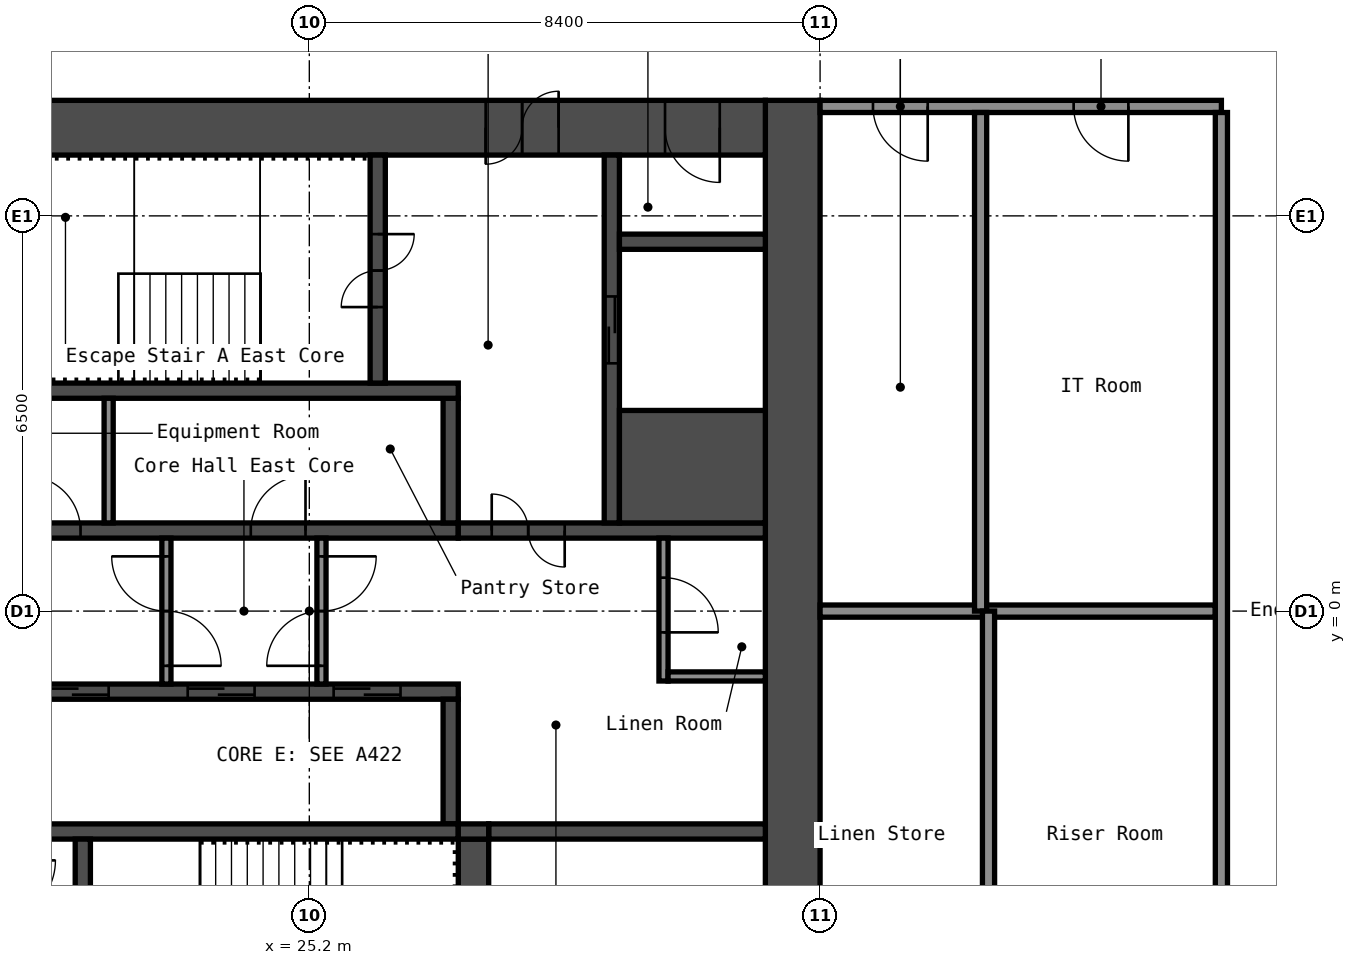
"""IFC4 building model, lengths in metres.
Left out: names, types, materials, properties, quantities, classifications, styles, units other than length and angle.
Written with IfcOpenShell. Run it as: python <this file> out.ifc"""

import sys

from ifc_helpers import new_model, si_unit, direction, frame, frame_2d, origin, place, context, subcontext, project, spatial, rectangle, extrude, element, fill, save


model = new_model("IFC4")
c1 = context("Model", 3, precision=1e-05, world=origin(), true_north=direction((0.0, 1.0)))
c2 = subcontext(c1, "Body", "Model", "MODEL_VIEW")
j1 = project(units=[si_unit("LENGTHUNIT", "METRE"), si_unit("PLANEANGLEUNIT", "RADIAN")], contexts=[c1])
p1 = place(None, origin())
s1 = spatial("IfcSite", under=j1, at=p1, CompositionType="ELEMENT")
p2 = place(p1, origin())
s2 = spatial("IfcBuilding", under=s1, at=p2, CompositionType="ELEMENT")
p3 = place(p2, frame((0.0, 0.0, 143.8)))
s3 = spatial("IfcBuildingStorey", under=s2, at=p3, CompositionType="ELEMENT", Elevation=143.8)
p4 = place(p3, frame((33.15, -8.4, 0.0), z_axis=(0.0, 0.0, 1.0), x_axis=(0.0, 1.0, 0.0)))
e1 = element("IfcWall", 1, at=p4, inside=s3, PredefinedType="SHEAR", context=c2, shape_type="SweptSolid", body=[
    extrude(rectangle(XDim=16.8, YDim=0.9, at=frame_2d((8.4, 0.0))), origin(), (0.0, 0.0, 1.0), 2.75),
])
p5 = place(p3, frame((17.7, 7.95, 0.0), z_axis=(0.0, 0.0, 1.0), x_axis=(1.0, 0.0, 0.0)))
e2 = element("IfcWall", 2, at=p5, inside=s3, PredefinedType="SHEAR", context=c2, shape_type="SweptSolid", body=[
    extrude(rectangle(XDim=15.0, YDim=0.9, at=frame_2d((7.5, 0.0))), origin(), (0.0, 0.0, 1.0), 2.75),
])
p6 = place(p5, frame((10.4, 0.0, 0.0)))
e3 = element("IfcOpeningElement", 3, at=p6, cuts=e2, PredefinedType="OPENING", context=c2, shape_type="SweptSolid", body=[
    extrude(rectangle(XDim=1.2, YDim=2.1, at=frame_2d((0.6, 1.05))), frame((0.0, 0.46, 0.0), z_axis=(0.0, -1.0, 0.0), x_axis=(1.0, 0.0, 0.0)), (0.0, 0.0, 1.0), 0.92),
])
p7 = place(p5, frame((13.35, 0.0, 0.0)))
e4 = element("IfcOpeningElement", 4, at=p7, cuts=e2, PredefinedType="OPENING", context=c2, shape_type="SweptSolid", body=[
    extrude(rectangle(XDim=0.9, YDim=2.1, at=frame_2d((0.45, 1.05))), frame((0.0, 0.46, 0.0), z_axis=(0.0, -1.0, 0.0), x_axis=(1.0, 0.0, 0.0)), (0.0, 0.0, 1.0), 0.92),
])
p8 = place(p3, frame((20.15, 1.325, 0.0), z_axis=(0.0, 0.0, 1.0), x_axis=(1.0, 0.0, 0.0)))
e5 = element("IfcWall", 5, at=p8, inside=s3, PredefinedType="SHEAR", context=c2, shape_type="SweptSolid", body=[
    extrude(rectangle(XDim=7.5, YDim=0.25, at=frame_2d((3.75, 0.0))), origin(), (0.0, 0.0, 1.0), 2.75),
])
p9 = place(p8, frame((0.387, 0.0, 0.0)))
e6 = element("IfcOpeningElement", 6, at=p9, cuts=e5, PredefinedType="OPENING", context=c2, shape_type="SweptSolid", body=[
    extrude(rectangle(XDim=0.9, YDim=2.1, at=frame_2d((0.45, 1.05))), frame((0.0, 0.135, 0.0), z_axis=(0.0, -1.0, 0.0), x_axis=(1.0, 0.0, 0.0)), (0.0, 0.0, 1.0), 0.27),
])
p10 = place(p8, frame((4.087, 0.0, 0.0)))
e7 = element("IfcOpeningElement", 7, at=p10, cuts=e5, PredefinedType="OPENING", context=c2, shape_type="SweptSolid", body=[
    extrude(rectangle(XDim=0.9, YDim=2.1, at=frame_2d((0.45, 1.05))), frame((0.0, 0.135, 0.0), z_axis=(0.0, -1.0, 0.0), x_axis=(1.0, 0.0, 0.0)), (0.0, 0.0, 1.0), 0.27),
])
p11 = place(p3, frame((27.525, 1.45, 0.0), z_axis=(0.0, 0.0, 1.0), x_axis=(0.0, 1.0, 0.0)))
e8 = element("IfcWall", 8, at=p11, inside=s3, PredefinedType="SHEAR", context=c2, shape_type="SweptSolid", body=[
    extrude(rectangle(XDim=2.05, YDim=0.25, at=frame_2d((1.025, 0.0))), origin(), (0.0, 0.0, 1.0), 2.75),
])
p12 = place(p3, frame((20.15, 3.625, 0.0), z_axis=(0.0, 0.0, 1.0), x_axis=(1.0, 0.0, 0.0)))
e9 = element("IfcWall", 9, at=p12, inside=s3, PredefinedType="SHEAR", context=c2, shape_type="SweptSolid", body=[
    extrude(rectangle(XDim=7.5, YDim=0.25, at=frame_2d((3.75, 0.0))), origin(), (0.0, 0.0, 1.0), 2.75),
])
p13 = place(p3, frame((26.325, 3.75, 0.0), z_axis=(0.0, 0.0, 1.0), x_axis=(0.0, 1.0, 0.0)))
e10 = element("IfcWall", 10, at=p13, inside=s3, PredefinedType="SHEAR", context=c2, shape_type="SweptSolid", body=[
    extrude(rectangle(XDim=3.75, YDim=0.25, at=frame_2d((1.875, 0.0))), origin(), (0.0, 0.0, 1.0), 2.75),
])
p14 = place(p13, frame((1.25, 0.0, 0.0)))
e11 = element("IfcOpeningElement", 11, at=p14, cuts=e10, PredefinedType="OPENING", context=c2, shape_type="SweptSolid", body=[
    extrude(rectangle(XDim=1.2, YDim=2.1, at=frame_2d((0.6, 1.05))), frame((0.0, 0.135, 0.0), z_axis=(0.0, -1.0, 0.0), x_axis=(1.0, 0.0, 0.0)), (0.0, 0.0, 1.0), 0.27),
])
p15 = place(p3, frame((27.65, 1.325, 0.0), z_axis=(0.0, 0.0, 1.0), x_axis=(1.0, 0.0, 0.0)))
e12 = element("IfcWall", 12, at=p15, inside=s3, PredefinedType="SHEAR", context=c2, shape_type="SweptSolid", body=[
    extrude(rectangle(XDim=5.05, YDim=0.25, at=frame_2d((2.525, 0.0))), origin(), (0.0, 0.0, 1.0), 2.75),
])
p16 = place(p15, frame((0.55, 0.0, 0.0)))
e13 = element("IfcOpeningElement", 13, at=p16, cuts=e12, PredefinedType="OPENING", context=c2, shape_type="SweptSolid", body=[
    extrude(rectangle(XDim=1.2, YDim=2.1, at=frame_2d((0.6, 1.05))), frame((0.0, 0.135, 0.0), z_axis=(0.0, -1.0, 0.0), x_axis=(1.0, 0.0, 0.0)), (0.0, 0.0, 1.0), 0.27),
])
p17 = place(p3, frame((30.175, 1.45, 0.0), z_axis=(0.0, 0.0, 1.0), x_axis=(0.0, 1.0, 0.0)))
e14 = element("IfcWall", 14, at=p17, inside=s3, PredefinedType="SHEAR", context=c2, shape_type="SweptSolid", body=[
    extrude(rectangle(XDim=6.05, YDim=0.25, at=frame_2d((3.025, 0.0))), origin(), (0.0, 0.0, 1.0), 2.75),
])
p18 = place(p17, frame((2.625, 0.0, 0.0)))
e15 = element("IfcOpeningElement", 15, at=p18, cuts=e14, PredefinedType="OPENING", context=c2, shape_type="SweptSolid", body=[
    extrude(rectangle(XDim=1.1, YDim=2.1, at=frame_2d((0.55, 1.05))), frame((0.0, 0.135, 0.0), z_axis=(0.0, -1.0, 0.0), x_axis=(1.0, 0.0, 0.0)), (0.0, 0.0, 1.0), 0.27),
])
p19 = place(p3, frame((30.3, 2.375, 0.0), z_axis=(0.0, 0.0, 1.0), x_axis=(1.0, 0.0, 0.0)))
e16 = element("IfcWall", 16, at=p19, inside=s3, PredefinedType="SHEAR", context=c2, shape_type="SweptSolid", body=[
    extrude(rectangle(XDim=2.4, YDim=1.85, at=frame_2d((1.2, 0.0))), origin(), (0.0, 0.0, 1.0), 2.75),
])
p20 = place(p3, frame((30.3, 6.075, 0.0), z_axis=(0.0, 0.0, 1.0), x_axis=(1.0, 0.0, 0.0)))
e17 = element("IfcWall", 17, at=p20, inside=s3, PredefinedType="SHEAR", context=c2, shape_type="SweptSolid", body=[
    extrude(rectangle(XDim=2.4, YDim=0.25, at=frame_2d((1.2, 0.0))), origin(), (0.0, 0.0, 1.0), 2.75),
])
p21 = place(p3, frame((20.15, -1.325, 0.0), z_axis=(0.0, 0.0, 1.0), x_axis=(1.0, 0.0, 0.0)))
e18 = element("IfcWall", 18, at=p21, inside=s3, PredefinedType="SHEAR", context=c2, shape_type="SweptSolid", body=[
    extrude(rectangle(XDim=7.5, YDim=0.25, at=frame_2d((3.75, 0.0))), origin(), (0.0, 0.0, 1.0), 2.75),
])
p22 = place(p21, frame((0.65, 0.0, 0.0)))
e19 = element("IfcOpeningElement", 19, at=p22, cuts=e18, PredefinedType="OPENING", context=c2, shape_type="SweptSolid", body=[
    extrude(rectangle(XDim=1.1, YDim=2.1, at=frame_2d((0.55, 1.05))), frame((0.0, 0.135, 0.0), z_axis=(0.0, -1.0, 0.0), x_axis=(1.0, 0.0, 0.0)), (0.0, 0.0, 1.0), 0.27),
])
p23 = place(p21, frame((3.05, 0.0, 0.0)))
e20 = element("IfcOpeningElement", 20, at=p23, cuts=e18, PredefinedType="OPENING", context=c2, shape_type="SweptSolid", body=[
    extrude(rectangle(XDim=1.1, YDim=2.1, at=frame_2d((0.55, 1.05))), frame((0.0, 0.135, 0.0), z_axis=(0.0, -1.0, 0.0), x_axis=(1.0, 0.0, 0.0)), (0.0, 0.0, 1.0), 0.27),
])
p24 = place(p21, frame((5.45, 0.0, 0.0)))
e21 = element("IfcOpeningElement", 21, at=p24, cuts=e18, PredefinedType="OPENING", context=c2, shape_type="SweptSolid", body=[
    extrude(rectangle(XDim=1.1, YDim=2.1, at=frame_2d((0.55, 1.05))), frame((0.0, 0.135, 0.0), z_axis=(0.0, -1.0, 0.0), x_axis=(1.0, 0.0, 0.0)), (0.0, 0.0, 1.0), 0.27),
])
p25 = place(p3, frame((27.525, -3.5, 0.0), z_axis=(0.0, 0.0, 1.0), x_axis=(0.0, 1.0, 0.0)))
e22 = element("IfcWall", 22, at=p25, inside=s3, PredefinedType="SHEAR", context=c2, shape_type="SweptSolid", body=[
    extrude(rectangle(XDim=2.05, YDim=0.25, at=frame_2d((1.025, 0.0))), origin(), (0.0, 0.0, 1.0), 2.75),
])
p26 = place(p3, frame((20.15, -3.625, 0.0), z_axis=(0.0, 0.0, 1.0), x_axis=(1.0, 0.0, 0.0)))
e23 = element("IfcWall", 23, at=p26, inside=s3, PredefinedType="SHEAR", context=c2, shape_type="SweptSolid", body=[
    extrude(rectangle(XDim=7.5, YDim=0.25, at=frame_2d((3.75, 0.0))), origin(), (0.0, 0.0, 1.0), 2.75),
])
p27 = place(p3, frame((21.475, -7.5, 0.0), z_axis=(0.0, 0.0, 1.0), x_axis=(0.0, 1.0, 0.0)))
e24 = element("IfcWall", 24, at=p27, inside=s3, PredefinedType="SHEAR", context=c2, shape_type="SweptSolid", body=[
    extrude(rectangle(XDim=3.75, YDim=0.25, at=frame_2d((1.875, 0.0))), origin(), (0.0, 0.0, 1.0), 2.75),
])
p28 = place(p27, frame((1.3, 0.0, 0.0)))
e25 = element("IfcOpeningElement", 25, at=p28, cuts=e24, PredefinedType="OPENING", context=c2, shape_type="SweptSolid", body=[
    extrude(rectangle(XDim=1.2, YDim=2.1, at=frame_2d((0.6, 1.05))), frame((0.0, 0.135, 0.0), z_axis=(0.0, -1.0, 0.0), x_axis=(1.0, 0.0, 0.0)), (0.0, 0.0, 1.0), 0.27),
])
p29 = place(p3, frame((27.9, -7.5, 0.0), z_axis=(0.0, 0.0, 1.0), x_axis=(0.0, 1.0, 0.0)))
e26 = element("IfcWall", 26, at=p29, inside=s3, PredefinedType="SHEAR", context=c2, shape_type="SweptSolid", body=[
    extrude(rectangle(XDim=3.75, YDim=0.5, at=frame_2d((1.875, 0.0))), origin(), (0.0, 0.0, 1.0), 2.75),
])
p30 = place(p3, frame((28.15, -3.625, 0.0), z_axis=(0.0, 0.0, 1.0), x_axis=(1.0, 0.0, 0.0)))
e27 = element("IfcWall", 27, at=p30, inside=s3, PredefinedType="SHEAR", context=c2, shape_type="SweptSolid", body=[
    extrude(rectangle(XDim=4.55, YDim=0.25, at=frame_2d((2.275, 0.0))), origin(), (0.0, 0.0, 1.0), 2.75),
])
p31 = place(p3, frame((27.65, -3.625, 0.0), z_axis=(0.0, 0.0, 1.0), x_axis=(1.0, 0.0, 0.0)))
e28 = element("IfcWall", 28, at=p31, inside=s3, PredefinedType="SHEAR", context=c2, shape_type="SweptSolid", body=[
    extrude(rectangle(XDim=0.5, YDim=0.25, at=frame_2d((0.25, 0.0))), origin(), (0.0, 0.0, 1.0), 2.75),
])
p32 = place(p3, frame((22.85, -1.2, 0.0), z_axis=(0.0, 0.0, 1.0), x_axis=(0.0, 1.0, 0.0)))
e29 = element("IfcWall", 29, at=p32, inside=s3, PredefinedType="PARTITIONING", context=c2, shape_type="SweptSolid", body=[
    extrude(rectangle(XDim=2.4, YDim=0.15, at=frame_2d((1.2, 0.0))), origin(), (0.0, 0.0, 1.0), 2.75),
])
p33 = place(p32, frame((0.3, 0.0, 0.0)))
e30 = element("IfcOpeningElement", 30, at=p33, cuts=e29, PredefinedType="OPENING", context=c2, shape_type="SweptSolid", body=[
    extrude(rectangle(XDim=1.8, YDim=2.1, at=frame_2d((0.9, 1.05))), frame((0.0, 0.085, 0.0), z_axis=(0.0, -1.0, 0.0), x_axis=(1.0, 0.0, 0.0)), (0.0, 0.0, 1.0), 0.17),
])
p34 = place(p3, frame((25.4, -1.2, 0.0), z_axis=(0.0, 0.0, 1.0), x_axis=(0.0, 1.0, 0.0)))
e31 = element("IfcWall", 31, at=p34, inside=s3, PredefinedType="PARTITIONING", context=c2, shape_type="SweptSolid", body=[
    extrude(rectangle(XDim=2.4, YDim=0.15, at=frame_2d((1.2, 0.0))), origin(), (0.0, 0.0, 1.0), 2.75),
])
p35 = place(p34, frame((0.3, 0.0, 0.0)))
e32 = element("IfcOpeningElement", 32, at=p35, cuts=e31, PredefinedType="OPENING", context=c2, shape_type="SweptSolid", body=[
    extrude(rectangle(XDim=1.8, YDim=2.1, at=frame_2d((0.9, 1.05))), frame((0.0, 0.085, 0.0), z_axis=(0.0, -1.0, 0.0), x_axis=(1.0, 0.0, 0.0)), (0.0, 0.0, 1.0), 0.17),
])
p36 = place(p3, frame((31.025, -1.15, 0.0), z_axis=(0.0, 0.0, 1.0), x_axis=(0.0, 1.0, 0.0)))
e33 = element("IfcWall", 33, at=p36, inside=s3, PredefinedType="PARTITIONING", context=c2, shape_type="SweptSolid", body=[
    extrude(rectangle(XDim=2.35, YDim=0.15, at=frame_2d((1.175, 0.0))), origin(), (0.0, 0.0, 1.0), 2.75),
])
p37 = place(p36, frame((0.8, 0.0, 0.0)))
e34 = element("IfcOpeningElement", 34, at=p37, cuts=e33, PredefinedType="OPENING", context=c2, shape_type="SweptSolid", body=[
    extrude(rectangle(XDim=0.9, YDim=2.1, at=frame_2d((0.45, 1.05))), frame((0.0, 0.085, 0.0), z_axis=(0.0, -1.0, 0.0), x_axis=(1.0, 0.0, 0.0)), (0.0, 0.0, 1.0), 0.17),
])
p38 = place(p3, frame((31.1, -1.075, 0.0), z_axis=(0.0, 0.0, 1.0), x_axis=(1.0, 0.0, 0.0)))
e35 = element("IfcWall", 35, at=p38, inside=s3, PredefinedType="PARTITIONING", context=c2, shape_type="SweptSolid", body=[
    extrude(rectangle(XDim=1.6, YDim=0.15, at=frame_2d((0.8, 0.0))), origin(), (0.0, 0.0, 1.0), 2.75),
])
p39 = place(p3, frame((21.9, 1.45, 0.0), z_axis=(0.0, 0.0, 1.0), x_axis=(0.0, 1.0, 0.0)))
e36 = element("IfcWall", 36, at=p39, inside=s3, PredefinedType="PARTITIONING", context=c2, shape_type="SweptSolid", body=[
    extrude(rectangle(XDim=2.05, YDim=0.15, at=frame_2d((1.025, 0.0))), origin(), (0.0, 0.0, 1.0), 2.75),
])
p40 = place(p3, frame((33.6, 0.0, 0.0), z_axis=(0.0, 0.0, 1.0), x_axis=(1.0, 0.0, 0.0)))
e37 = element("IfcWall", 37, at=p40, inside=s3, PredefinedType="PARTITIONING", context=c2, shape_type="SweptSolid", body=[
    extrude(rectangle(XDim=6.5, YDim=0.2, at=frame_2d((3.25, 0.0))), origin(), (0.0, 0.0, 1.0), 2.75),
])
p41 = place(p3, frame((33.6, 8.3, 0.0), z_axis=(0.0, 0.0, 1.0), x_axis=(1.0, 0.0, 0.0)))
e38 = element("IfcWall", 38, at=p41, inside=s3, PredefinedType="PARTITIONING", context=c2, shape_type="SweptSolid", body=[
    extrude(rectangle(XDim=6.6, YDim=0.2, at=frame_2d((3.3, 0.0))), origin(), (0.0, 0.0, 1.0), 2.75),
])
p42 = place(p41, frame((0.87, 0.0, 0.0)))
e39 = element("IfcOpeningElement", 39, at=p42, cuts=e38, PredefinedType="OPENING", context=c2, shape_type="SweptSolid", body=[
    extrude(rectangle(XDim=0.9, YDim=2.1, at=frame_2d((0.45, 1.05))), frame((0.0, 0.11, 0.0), z_axis=(0.0, -1.0, 0.0), x_axis=(1.0, 0.0, 0.0)), (0.0, 0.0, 1.0), 0.22),
])
p43 = place(p41, frame((4.17, 0.0, 0.0)))
e40 = element("IfcOpeningElement", 40, at=p43, cuts=e38, PredefinedType="OPENING", context=c2, shape_type="SweptSolid", body=[
    extrude(rectangle(XDim=0.9, YDim=2.1, at=frame_2d((0.45, 1.05))), frame((0.0, 0.11, 0.0), z_axis=(0.0, -1.0, 0.0), x_axis=(1.0, 0.0, 0.0)), (0.0, 0.0, 1.0), 0.22),
])
for number, where, z_axis, x_axis in (
    (41, (36.24, 0.0, 0.0), (0.0, 0.0, 1.0), (0.0, 1.0, 0.0)),
    (42, (36.37, -8.2, 0.0), (0.0, 0.0, 1.0), (0.0, 1.0, 0.0)),
):
    element("IfcWall", number, at=place(p3, frame(where, z_axis=z_axis, x_axis=x_axis)), inside=s3, PredefinedType="PARTITIONING", context=c2, shape_type="SweptSolid", body=[
        extrude(rectangle(XDim=8.2, YDim=0.2, at=frame_2d((4.1, 0.0))), origin(), (0.0, 0.0, 1.0), 2.75),
    ])
p44 = place(p3, frame((40.2, -8.2, 0.0), z_axis=(0.0, 0.0, 1.0), x_axis=(0.0, 1.0, 0.0)))
e43 = element("IfcWall", 43, at=p44, inside=s3, PredefinedType="PARTITIONING", context=c2, shape_type="SweptSolid", body=[
    extrude(rectangle(XDim=16.4, YDim=0.2, at=frame_2d((8.2, 0.0))), origin(), (0.0, 0.0, 1.0), 2.75),
])
p45 = place(p6, origin())
e44 = element("IfcDoor", 44, at=p45, inside=s3, OperationType="DOUBLE_DOOR_SINGLE_SWING", PredefinedType="DOOR", context=c2, shape_type="SweptSolid", body=[
    extrude(rectangle(XDim=1.2, YDim=2.1, at=frame_2d((0.6, 1.05))), frame((0.0, 0.025, 0.0), z_axis=(0.0, -1.0, 0.0), x_axis=(1.0, 0.0, 0.0)), (0.0, 0.0, 1.0), 0.05),
])
fill(e3, e44)
p46 = place(p7, origin())
e45 = element("IfcDoor", 45, at=p46, inside=s3, OperationType="SINGLE_SWING_RIGHT", PredefinedType="DOOR", context=c2, shape_type="SweptSolid", body=[
    extrude(rectangle(XDim=0.9, YDim=2.1, at=frame_2d((0.45, 1.05))), frame((0.0, 0.025, 0.0), z_axis=(0.0, -1.0, 0.0), x_axis=(1.0, 0.0, 0.0)), (0.0, 0.0, 1.0), 0.05),
])
fill(e4, e45)
p47 = place(p14, origin())
e46 = element("IfcDoor", 46, at=p47, inside=s3, OperationType="DOUBLE_DOOR_SINGLE_SWING", PredefinedType="DOOR", context=c2, shape_type="SweptSolid", body=[
    extrude(rectangle(XDim=1.2, YDim=2.1, at=frame_2d((0.6, 1.05))), frame((0.0, 0.025, 0.0), z_axis=(0.0, -1.0, 0.0), x_axis=(1.0, 0.0, 0.0)), (0.0, 0.0, 1.0), 0.05),
])
fill(e11, e46)
p48 = place(p16, origin())
e47 = element("IfcDoor", 47, at=p48, inside=s3, OperationType="DOUBLE_DOOR_SINGLE_SWING", PredefinedType="DOOR", context=c2, shape_type="SweptSolid", body=[
    extrude(rectangle(XDim=1.2, YDim=2.1, at=frame_2d((0.6, 1.05))), frame((0.0, 0.025, 0.0), z_axis=(0.0, -1.0, 0.0), x_axis=(1.0, 0.0, 0.0)), (0.0, 0.0, 1.0), 0.05),
])
fill(e13, e47)
p49 = place(p33, origin())
e48 = element("IfcDoor", 48, at=p49, inside=s3, OperationType="DOUBLE_DOOR_SINGLE_SWING", PredefinedType="DOOR", context=c2, shape_type="SweptSolid", body=[
    extrude(rectangle(XDim=1.8, YDim=2.1, at=frame_2d((0.9, 1.05))), frame((0.0, 0.025, 0.0), z_axis=(0.0, -1.0, 0.0), x_axis=(1.0, 0.0, 0.0)), (0.0, 0.0, 1.0), 0.05),
])
fill(e30, e48)
p50 = place(p35, origin())
e49 = element("IfcDoor", 49, at=p50, inside=s3, OperationType="DOUBLE_DOOR_SINGLE_SWING", PredefinedType="DOOR", context=c2, shape_type="SweptSolid", body=[
    extrude(rectangle(XDim=1.8, YDim=2.1, at=frame_2d((0.9, 1.05))), frame((0.0, 0.025, 0.0), z_axis=(0.0, -1.0, 0.0), x_axis=(1.0, 0.0, 0.0)), (0.0, 0.0, 1.0), 0.05),
])
fill(e32, e49)
p51 = place(p37, origin())
e50 = element("IfcDoor", 50, at=p51, inside=s3, OperationType="SINGLE_SWING_LEFT", PredefinedType="DOOR", context=c2, shape_type="SweptSolid", body=[
    extrude(rectangle(XDim=0.9, YDim=2.1, at=frame_2d((0.45, 1.05))), frame((0.0, 0.025, 0.0), z_axis=(0.0, -1.0, 0.0), x_axis=(1.0, 0.0, 0.0)), (0.0, 0.0, 1.0), 0.05),
])
fill(e34, e50)
p52 = place(p9, origin())
e51 = element("IfcDoor", 51, at=p52, inside=s3, OperationType="SINGLE_SWING_RIGHT", PredefinedType="DOOR", context=c2, shape_type="SweptSolid", body=[
    extrude(rectangle(XDim=0.9, YDim=2.1, at=frame_2d((0.45, 1.05))), frame((0.0, 0.025, 0.0), z_axis=(0.0, -1.0, 0.0), x_axis=(1.0, 0.0, 0.0)), (0.0, 0.0, 1.0), 0.05),
])
fill(e6, e51)
p53 = place(p10, origin())
e52 = element("IfcDoor", 52, at=p53, inside=s3, OperationType="SINGLE_SWING_LEFT", PredefinedType="DOOR", context=c2, shape_type="SweptSolid", body=[
    extrude(rectangle(XDim=0.9, YDim=2.1, at=frame_2d((0.45, 1.05))), frame((0.0, 0.025, 0.0), z_axis=(0.0, -1.0, 0.0), x_axis=(1.0, 0.0, 0.0)), (0.0, 0.0, 1.0), 0.05),
])
fill(e7, e52)
p54 = place(p22, origin())
e53 = element("IfcDoor", 53, at=p54, inside=s3, OperationType="DOUBLE_DOOR_SLIDING", PredefinedType="DOOR", context=c2, shape_type="SweptSolid", body=[
    extrude(rectangle(XDim=1.1, YDim=2.1, at=frame_2d((0.55, 1.05))), frame((0.0, 0.025, 0.0), z_axis=(0.0, -1.0, 0.0), x_axis=(1.0, 0.0, 0.0)), (0.0, 0.0, 1.0), 0.05),
])
fill(e19, e53)
p55 = place(p23, origin())
e54 = element("IfcDoor", 54, at=p55, inside=s3, OperationType="DOUBLE_DOOR_SLIDING", PredefinedType="DOOR", context=c2, shape_type="SweptSolid", body=[
    extrude(rectangle(XDim=1.1, YDim=2.1, at=frame_2d((0.55, 1.05))), frame((0.0, 0.025, 0.0), z_axis=(0.0, -1.0, 0.0), x_axis=(1.0, 0.0, 0.0)), (0.0, 0.0, 1.0), 0.05),
])
fill(e20, e54)
p56 = place(p24, origin())
e55 = element("IfcDoor", 55, at=p56, inside=s3, OperationType="DOUBLE_DOOR_SLIDING", PredefinedType="DOOR", context=c2, shape_type="SweptSolid", body=[
    extrude(rectangle(XDim=1.1, YDim=2.1, at=frame_2d((0.55, 1.05))), frame((0.0, 0.025, 0.0), z_axis=(0.0, -1.0, 0.0), x_axis=(1.0, 0.0, 0.0)), (0.0, 0.0, 1.0), 0.05),
])
fill(e21, e55)
p57 = place(p18, origin())
e56 = element("IfcDoor", 56, at=p57, inside=s3, OperationType="DOUBLE_DOOR_SLIDING", PredefinedType="DOOR", context=c2, shape_type="SweptSolid", body=[
    extrude(rectangle(XDim=1.1, YDim=2.1, at=frame_2d((0.55, 1.05))), frame((0.0, 0.025, 0.0), z_axis=(0.0, -1.0, 0.0), x_axis=(1.0, 0.0, 0.0)), (0.0, 0.0, 1.0), 0.05),
])
fill(e15, e56)
p58 = place(p42, origin())
e57 = element("IfcDoor", 57, at=p58, inside=s3, OperationType="SINGLE_SWING_RIGHT", PredefinedType="DOOR", context=c2, shape_type="SweptSolid", body=[
    extrude(rectangle(XDim=0.9, YDim=2.1, at=frame_2d((0.45, 1.05))), frame((0.0, 0.025, 0.0), z_axis=(0.0, -1.0, 0.0), x_axis=(1.0, 0.0, 0.0)), (0.0, 0.0, 1.0), 0.05),
])
fill(e39, e57)
p59 = place(p43, origin())
e58 = element("IfcDoor", 58, at=p59, inside=s3, OperationType="SINGLE_SWING_RIGHT", PredefinedType="DOOR", context=c2, shape_type="SweptSolid", body=[
    extrude(rectangle(XDim=0.9, YDim=2.1, at=frame_2d((0.45, 1.05))), frame((0.0, 0.025, 0.0), z_axis=(0.0, -1.0, 0.0), x_axis=(1.0, 0.0, 0.0)), (0.0, 0.0, 1.0), 0.05),
])
fill(e40, e58)
save(model, sys.argv[1])
